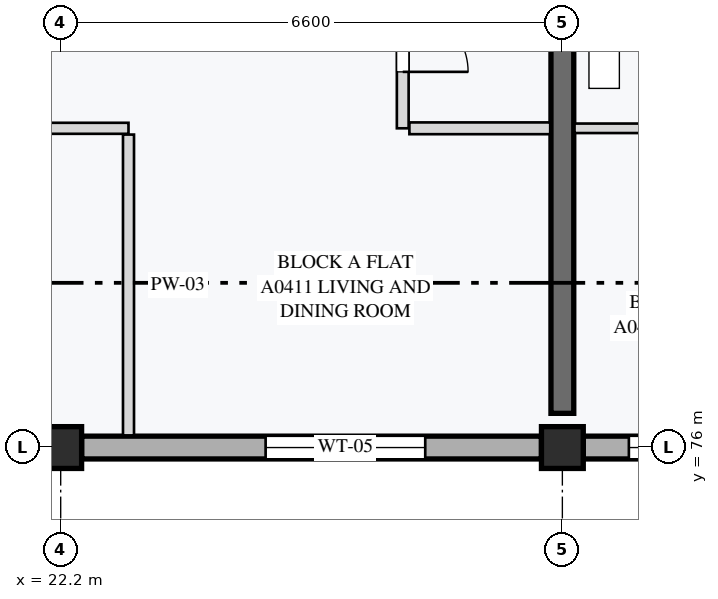
"""IFC4 building model, lengths in metres.
Left out: names, types, materials, properties, quantities, classifications, styles, units other than length and angle.
Written with IfcOpenShell. Run it as: python <this file> out.ifc"""

import sys

from ifc_helpers import new_model, si_unit, direction, frame, frame_2d, origin, origin_2d, place, context, subcontext, project, spatial, rectangle, extrude, element, fill, save


model = new_model("IFC4")
c1 = context("Model", 3, precision=1e-05, world=origin(), true_north=direction((0.0, 1.0)))
c2 = subcontext(c1, "Body", "Model", "MODEL_VIEW")
j1 = project(units=[si_unit("LENGTHUNIT", "METRE"), si_unit("PLANEANGLEUNIT", "RADIAN")], contexts=[c1])
p1 = place(None, origin())
s1 = spatial("IfcSite", under=j1, at=p1, CompositionType="ELEMENT")
p2 = place(p1, origin())
s2 = spatial("IfcBuilding", under=s1, at=p2, CompositionType="ELEMENT")
p3 = place(p2, frame((0.0, 0.0, 14.8)))
s3 = spatial("IfcBuildingStorey", under=s2, at=p3, CompositionType="ELEMENT", Elevation=14.8)
for number, where, z_axis, x_axis in (
    (1, (22.2, 76.0, 0.0), (0.0, 0.0, 1.0), (1.0, 0.0, 0.0)),
    (2, (28.8, 76.0, 0.0), (0.0, 0.0, 1.0), (1.0, 0.0, 0.0)),
):
    element("IfcColumn", number, at=place(p3, frame(where, z_axis=z_axis, x_axis=x_axis)), inside=s3, PredefinedType="COLUMN", context=c2, shape_type="SweptSolid", body=[
        extrude(rectangle(XDim=0.55, YDim=0.55, at=origin_2d()), origin(), (0.0, 0.0, 1.0), 3.2),
    ])
p4 = place(p3, frame((28.8, 76.45, 0.0), z_axis=(0.0, 0.0, 1.0), x_axis=(0.0, 1.0, 0.0)))
e3 = element("IfcWall", 3, at=p4, inside=s3, PredefinedType="SHEAR", context=c2, shape_type="SweptSolid", body=[
    extrude(rectangle(XDim=5.7, YDim=0.3, at=frame_2d((2.85, 0.0))), origin(), (0.0, 0.0, 1.0), 2.96),
])
p5 = place(p3, frame((22.475, 76.0, 0.0), z_axis=(0.0, 0.0, 1.0), x_axis=(1.0, 0.0, 0.0)))
e4 = element("IfcWall", 4, at=p5, inside=s3, PredefinedType="STANDARD", context=c2, shape_type="SweptSolid", body=[
    extrude(rectangle(XDim=6.05, YDim=0.3, at=frame_2d((3.025, 0.0))), origin(), (0.0, 0.0, 1.0), 2.6),
])
p6 = place(p5, frame((2.421, 0.0, 0.85)))
e5 = element("IfcOpeningElement", 5, at=p6, cuts=e4, PredefinedType="OPENING", context=c2, shape_type="SweptSolid", body=[
    extrude(rectangle(XDim=2.1, YDim=1.55, at=frame_2d((1.05, 0.775))), frame((0.0, 0.16, 0.0), z_axis=(0.0, -1.0, 0.0), x_axis=(1.0, 0.0, 0.0)), (0.0, 0.0, 1.0), 0.32),
])
p7 = place(p3, frame((29.075, 76.0, 0.0), z_axis=(0.0, 0.0, 1.0), x_axis=(1.0, 0.0, 0.0)))
e6 = element("IfcWall", 6, at=p7, inside=s3, PredefinedType="STANDARD", context=c2, shape_type="SweptSolid", body=[
    extrude(rectangle(XDim=6.05, YDim=0.3, at=frame_2d((3.025, 0.0))), origin(), (0.0, 0.0, 1.0), 2.6),
])
p8 = place(p7, frame((0.6, 0.0, 0.85)))
e7 = element("IfcOpeningElement", 7, at=p8, cuts=e6, PredefinedType="OPENING", context=c2, shape_type="SweptSolid", body=[
    extrude(rectangle(XDim=1.8, YDim=1.35, at=frame_2d((0.9, 0.675))), frame((0.0, 0.16, 0.0), z_axis=(0.0, -1.0, 0.0), x_axis=(1.0, 0.0, 0.0)), (0.0, 0.0, 1.0), 0.32),
])
p9 = place(p3, frame((26.7, 82.502, 0.0), z_axis=(0.0, 0.0, 1.0), x_axis=(0.0, -1.0, 0.0)))
e8 = element("IfcWall", 8, at=p9, inside=s3, PredefinedType="PARTITIONING", context=c2, shape_type="SweptSolid", body=[
    extrude(rectangle(XDim=2.302, YDim=0.155, at=frame_2d((1.151, 0.0))), origin(), (0.0, 0.0, 1.0), 2.96),
])
p10 = place(p9, frame((0.7, 0.0, 0.0)))
e9 = element("IfcOpeningElement", 9, at=p10, cuts=e8, PredefinedType="OPENING", context=c2, shape_type="SweptSolid", body=[
    extrude(rectangle(XDim=0.86, YDim=2.12, at=frame_2d((0.43, 1.06))), frame((0.0, 0.087, 0.0), z_axis=(0.0, -1.0, 0.0), x_axis=(1.0, 0.0, 0.0)), (0.0, 0.0, 1.0), 0.175),
])
p11 = place(p3, frame((26.788, 80.2, 0.0), z_axis=(0.0, 0.0, 1.0), x_axis=(1.0, 0.0, 0.0)))
e10 = element("IfcWall", 10, at=p11, inside=s3, PredefinedType="PARTITIONING", context=c2, shape_type="SweptSolid", body=[
    extrude(rectangle(XDim=1.852, YDim=0.155, at=frame_2d((0.926, 0.0))), origin(), (0.0, 0.0, 1.0), 2.96),
])
p12 = place(p3, frame((19.232, 80.2, 0.0), z_axis=(0.0, 0.0, 1.0), x_axis=(1.0, 0.0, 0.0)))
e11 = element("IfcWall", 11, at=p12, inside=s3, PredefinedType="PARTITIONING", context=c2, shape_type="SweptSolid", body=[
    extrude(rectangle(XDim=3.86, YDim=0.145, at=frame_2d((1.93, 0.0))), origin(), (0.0, 0.0, 1.0), 2.96),
])
p13 = place(p12, frame((1.546, 0.0, 0.0)))
e12 = element("IfcOpeningElement", 12, at=p13, cuts=e11, PredefinedType="OPENING", context=c2, shape_type="SweptSolid", body=[
    extrude(rectangle(XDim=0.87, YDim=2.08, at=frame_2d((0.435, 1.04))), frame((0.0, 0.083, 0.0), z_axis=(0.0, -1.0, 0.0), x_axis=(1.0, 0.0, 0.0)), (0.0, 0.0, 1.0), 0.165),
])
p14 = place(p3, frame((23.092, 80.117, 0.0), z_axis=(0.0, 0.0, 1.0), x_axis=(0.0, -1.0, 0.0)))
e13 = element("IfcWall", 13, at=p14, inside=s3, PredefinedType="PARTITIONING", context=c2, shape_type="SweptSolid", body=[
    extrude(rectangle(XDim=3.958, YDim=0.145, at=frame_2d((1.979, 0.0))), origin(), (0.0, 0.0, 1.0), 2.96),
])
p15 = place(p3, frame((28.96, 80.2, 0.0), z_axis=(0.0, 0.0, 1.0), x_axis=(1.0, 0.0, 0.0)))
e14 = element("IfcWall", 14, at=p15, inside=s3, PredefinedType="PARTITIONING", context=c2, shape_type="SweptSolid", body=[
    extrude(rectangle(XDim=1.66, YDim=0.125, at=frame_2d((0.83, 0.0))), origin(), (0.0, 0.0, 1.0), 2.96),
])
p16 = place(p6, origin())
e15 = element("IfcWindow", 15, at=p16, inside=s3, PartitioningType="SINGLE_PANEL", PredefinedType="WINDOW", context=c2, shape_type="SweptSolid", body=[
    extrude(rectangle(XDim=2.1, YDim=1.55, at=frame_2d((1.05, 0.775))), frame((0.0, 0.03, 0.0), z_axis=(0.0, -1.0, 0.0), x_axis=(1.0, 0.0, 0.0)), (0.0, 0.0, 1.0), 0.06),
])
fill(e5, e15)
p17 = place(p8, origin())
e16 = element("IfcWindow", 16, at=p17, inside=s3, PartitioningType="SINGLE_PANEL", PredefinedType="WINDOW", context=c2, shape_type="SweptSolid", body=[
    extrude(rectangle(XDim=1.8, YDim=1.35, at=frame_2d((0.9, 0.675))), frame((0.0, 0.03, 0.0), z_axis=(0.0, -1.0, 0.0), x_axis=(1.0, 0.0, 0.0)), (0.0, 0.0, 1.0), 0.06),
])
fill(e7, e16)
p18 = place(p10, origin())
e17 = element("IfcDoor", 17, at=p18, inside=s3, OperationType="SINGLE_SWING_RIGHT", PredefinedType="DOOR", context=c2, shape_type="SweptSolid", body=[
    extrude(rectangle(XDim=0.86, YDim=2.12, at=frame_2d((0.43, 1.06))), frame((0.0, 0.025, 0.0), z_axis=(0.0, -1.0, 0.0), x_axis=(1.0, 0.0, 0.0)), (0.0, 0.0, 1.0), 0.05),
])
fill(e9, e17)
save(model, sys.argv[1])
